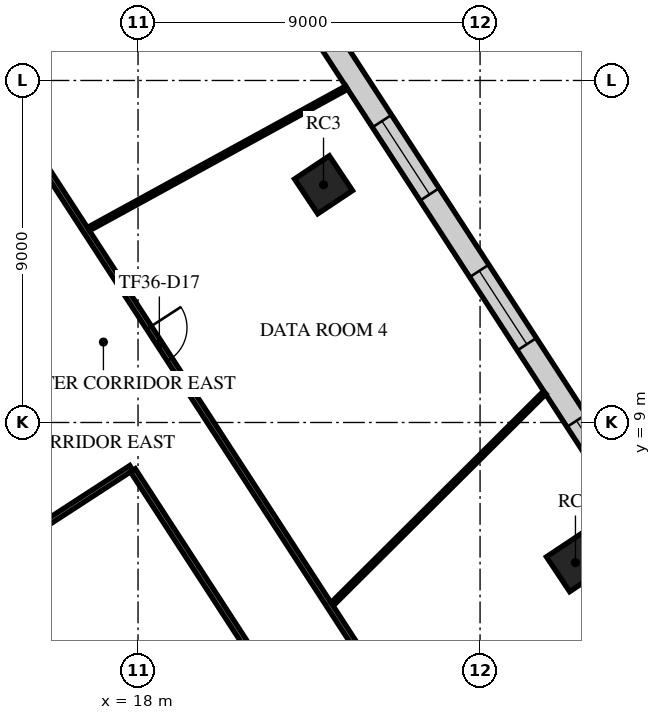
"""IFC4 building model, lengths in metres.
Left out: names, types, materials, properties, quantities, classifications, styles, units other than length and angle.
Written with IfcOpenShell. Run it as: python <this file> out.ifc"""

import sys

from ifc_helpers import new_model, si_unit, direction, frame, frame_2d, origin, origin_2d, place, context, subcontext, project, spatial, rectangle, extrude, element, fill, save


model = new_model("IFC4")
c1 = context("Model", 3, precision=1e-05, world=origin(), true_north=direction((0.0, 1.0)))
c2 = subcontext(c1, "Body", "Model", "MODEL_VIEW")
j1 = project(units=[si_unit("LENGTHUNIT", "METRE"), si_unit("PLANEANGLEUNIT", "RADIAN")], contexts=[c1])
p1 = place(None, origin())
s1 = spatial("IfcSite", under=j1, at=p1, CompositionType="ELEMENT")
p2 = place(p1, origin())
s2 = spatial("IfcBuilding", under=s1, at=p2, CompositionType="ELEMENT")
p3 = place(p2, frame((0.0, 0.0, 155.7)))
s3 = spatial("IfcBuildingStorey", under=s2, at=p3, CompositionType="ELEMENT", Elevation=155.7)
for number, where, z_axis, x_axis in (
    (1, (29.51, 5.312, 0.0), (0.0, 0.0, 1.0), (0.832, 0.555, 0.0)),
    (2, (22.881, 15.255, 0.0), (0.0, 0.0, 1.0), (0.832, 0.555, 0.0)),
):
    element("IfcColumn", number, at=place(p3, frame(where, z_axis=z_axis, x_axis=x_axis)), inside=s3, PredefinedType="COLUMN", context=c2, shape_type="SweptSolid", body=[
        extrude(rectangle(XDim=1.1, YDim=1.1, at=origin_2d()), origin(), (0.0, 0.0, 1.0), 4.0),
    ])
p4 = place(p3, frame((36.496, -1.667, 0.0), z_axis=(0.0, 0.0, 1.0), x_axis=(-0.544637117646, 0.838671813096, 0.0)))
e3 = element("IfcWall", 3, at=p4, inside=s3, PredefinedType="STANDARD", context=c2, shape_type="SweptSolid", body=[
    extrude(rectangle(XDim=42.176, YDim=0.6, at=frame_2d((21.088, 0.0))), origin(), (0.0, 0.0, 1.0), 3.6),
])
p5 = place(p4, frame((1.138, 0.0, 0.9)))
e4 = element("IfcOpeningElement", 4, at=p5, cuts=e3, PredefinedType="OPENING", context=c2, shape_type="SweptSolid", body=[
    extrude(rectangle(XDim=2.3, YDim=2.1, at=frame_2d((1.15, 1.05))), frame((0.0, 0.31, 0.0), z_axis=(0.0, -1.0, 0.0), x_axis=(1.0, 0.0, 0.0)), (0.0, 0.0, 1.0), 0.62),
])
p6 = place(p4, frame((5.776, 0.0, 0.9)))
e5 = element("IfcOpeningElement", 5, at=p6, cuts=e3, PredefinedType="OPENING", context=c2, shape_type="SweptSolid", body=[
    extrude(rectangle(XDim=2.3, YDim=2.1, at=frame_2d((1.15, 1.05))), frame((0.0, 0.31, 0.0), z_axis=(0.0, -1.0, 0.0), x_axis=(1.0, 0.0, 0.0)), (0.0, 0.0, 1.0), 0.62),
])
p7 = place(p4, frame((10.476, 0.0, 0.9)))
e6 = element("IfcOpeningElement", 6, at=p7, cuts=e3, PredefinedType="OPENING", context=c2, shape_type="SweptSolid", body=[
    extrude(rectangle(XDim=2.3, YDim=2.1, at=frame_2d((1.15, 1.05))), frame((0.0, 0.31, 0.0), z_axis=(0.0, -1.0, 0.0), x_axis=(1.0, 0.0, 0.0)), (0.0, 0.0, 1.0), 0.62),
])
p8 = place(p4, frame((15.176, 0.0, 0.9)))
e7 = element("IfcOpeningElement", 7, at=p8, cuts=e3, PredefinedType="OPENING", context=c2, shape_type="SweptSolid", body=[
    extrude(rectangle(XDim=2.3, YDim=2.1, at=frame_2d((1.15, 1.05))), frame((0.0, 0.31, 0.0), z_axis=(0.0, -1.0, 0.0), x_axis=(1.0, 0.0, 0.0)), (0.0, 0.0, 1.0), 0.62),
])
p9 = place(p4, frame((19.876, 0.0, 0.9)))
e8 = element("IfcOpeningElement", 8, at=p9, cuts=e3, PredefinedType="OPENING", context=c2, shape_type="SweptSolid", body=[
    extrude(rectangle(XDim=2.3, YDim=2.1, at=frame_2d((1.15, 1.05))), frame((0.0, 0.31, 0.0), z_axis=(0.0, -1.0, 0.0), x_axis=(1.0, 0.0, 0.0)), (0.0, 0.0, 1.0), 0.62),
])
p10 = place(p4, frame((24.576, 0.0, 0.9)))
e9 = element("IfcOpeningElement", 9, at=p10, cuts=e3, PredefinedType="OPENING", context=c2, shape_type="SweptSolid", body=[
    extrude(rectangle(XDim=2.3, YDim=2.1, at=frame_2d((1.15, 1.05))), frame((0.0, 0.31, 0.0), z_axis=(0.0, -1.0, 0.0), x_axis=(1.0, 0.0, 0.0)), (0.0, 0.0, 1.0), 0.62),
])
p11 = place(p4, frame((29.276, 0.0, 0.9)))
e10 = element("IfcOpeningElement", 10, at=p11, cuts=e3, PredefinedType="OPENING", context=c2, shape_type="SweptSolid", body=[
    extrude(rectangle(XDim=2.3, YDim=2.1, at=frame_2d((1.15, 1.05))), frame((0.0, 0.31, 0.0), z_axis=(0.0, -1.0, 0.0), x_axis=(1.0, 0.0, 0.0)), (0.0, 0.0, 1.0), 0.62),
])
p12 = place(p4, frame((33.976, 0.0, 0.9)))
e11 = element("IfcOpeningElement", 11, at=p12, cuts=e3, PredefinedType="OPENING", context=c2, shape_type="SweptSolid", body=[
    extrude(rectangle(XDim=2.3, YDim=2.1, at=frame_2d((1.15, 1.05))), frame((0.0, 0.31, 0.0), z_axis=(0.0, -1.0, 0.0), x_axis=(1.0, 0.0, 0.0)), (0.0, 0.0, 1.0), 0.62),
])
p13 = place(p4, frame((38.676, 0.0, 0.9)))
e12 = element("IfcOpeningElement", 12, at=p13, cuts=e3, PredefinedType="OPENING", context=c2, shape_type="SweptSolid", body=[
    extrude(rectangle(XDim=2.3, YDim=2.1, at=frame_2d((1.15, 1.05))), frame((0.0, 0.31, 0.0), z_axis=(0.0, -1.0, 0.0), x_axis=(1.0, 0.0, 0.0)), (0.0, 0.0, 1.0), 0.62),
])
p14 = place(p3, frame((10.958, 22.783, 0.0), z_axis=(0.0, 0.0, 1.0), x_axis=(0.544655201926, -0.838660068809, 0.0)))
e13 = element("IfcWall", 13, at=p14, inside=s3, PredefinedType="PARTITIONING", context=c2, shape_type="SweptSolid", body=[
    extrude(rectangle(XDim=26.354, YDim=0.15, at=frame_2d((13.177, 0.0))), origin(), (0.0, 0.0, 1.0), 3.15),
])
p15 = place(p14, frame((13.46, 0.0, 0.0)))
e14 = element("IfcOpeningElement", 14, at=p15, cuts=e13, PredefinedType="OPENING", context=c2, shape_type="SweptSolid", body=[
    extrude(rectangle(XDim=1.0, YDim=2.1, at=frame_2d((0.5, 1.05))), frame((0.0, 0.085, 0.0), z_axis=(0.0, -1.0, 0.0), x_axis=(1.0, 0.0, 0.0)), (0.0, 0.0, 1.0), 0.17),
])
p16 = place(p3, frame((15.516, 6.304, 0.0), z_axis=(0.0, 0.0, 1.0), x_axis=(0.838528716493, 0.544857404846, 0.0)))
e15 = element("IfcWall", 15, at=p16, inside=s3, PredefinedType="PARTITIONING", context=c2, shape_type="SweptSolid", body=[
    extrude(rectangle(XDim=2.753, YDim=0.15, at=frame_2d((1.376, 0.0))), origin(), (0.0, 0.0, 1.0), 3.6),
])
p17 = place(p3, frame((17.865, 7.741, 0.0), z_axis=(0.0, 0.0, 1.0), x_axis=(0.544664903491, -0.838653768193, 0.0)))
e16 = element("IfcWall", 16, at=p17, inside=s3, PredefinedType="PARTITIONING", context=c2, shape_type="SweptSolid", body=[
    extrude(rectangle(XDim=9.977, YDim=0.15, at=frame_2d((4.988, 0.0))), origin(), (0.0, 0.0, 1.0), 3.15),
])
p18 = place(p17, frame((6.05, 0.0, 0.0)))
e17 = element("IfcOpeningElement", 17, at=p18, cuts=e16, PredefinedType="OPENING", context=c2, shape_type="SweptSolid", body=[
    extrude(rectangle(XDim=1.0, YDim=2.1, at=frame_2d((0.5, 1.05))), frame((0.0, 0.085, 0.0), z_axis=(0.0, -1.0, 0.0), x_axis=(1.0, 0.0, 0.0)), (0.0, 0.0, 1.0), 0.17),
])
p19 = place(p3, frame((16.697, 14.091, 0.0), z_axis=(0.0, 0.0, 1.0), x_axis=(0.877061470745, 0.480378159926, 0.0)))
e18 = element("IfcWall", 18, at=p19, inside=s3, PredefinedType="PARTITIONING", context=c2, shape_type="SweptSolid", body=[
    extrude(rectangle(XDim=7.742, YDim=0.1, at=frame_2d((3.871, 0.0))), origin(), (0.0, 0.0, 1.0), 2.9),
])
p20 = place(p3, frame((23.113, 4.223, 0.0), z_axis=(0.0, 0.0, 1.0), x_axis=(0.708669203066, 0.705540899329, 0.0)))
e19 = element("IfcWall", 19, at=p20, inside=s3, PredefinedType="PARTITIONING", context=c2, shape_type="SweptSolid", body=[
    extrude(rectangle(XDim=7.882, YDim=0.1, at=frame_2d((3.941, 0.0))), origin(), (0.0, 0.0, 1.0), 2.9),
])
p21 = place(p7, origin())
e20 = element("IfcWindow", 20, at=p21, inside=s3, PartitioningType="SINGLE_PANEL", PredefinedType="WINDOW", context=c2, shape_type="SweptSolid", body=[
    extrude(rectangle(XDim=2.3, YDim=2.1, at=frame_2d((1.15, 1.05))), frame((0.0, 0.03, 0.0), z_axis=(0.0, -1.0, 0.0), x_axis=(1.0, 0.0, 0.0)), (0.0, 0.0, 1.0), 0.06),
])
fill(e6, e20)
p22 = place(p8, origin())
e21 = element("IfcWindow", 21, at=p22, inside=s3, PartitioningType="SINGLE_PANEL", PredefinedType="WINDOW", context=c2, shape_type="SweptSolid", body=[
    extrude(rectangle(XDim=2.3, YDim=2.1, at=frame_2d((1.15, 1.05))), frame((0.0, 0.03, 0.0), z_axis=(0.0, -1.0, 0.0), x_axis=(1.0, 0.0, 0.0)), (0.0, 0.0, 1.0), 0.06),
])
fill(e7, e21)
p23 = place(p9, origin())
e22 = element("IfcWindow", 22, at=p23, inside=s3, PartitioningType="SINGLE_PANEL", PredefinedType="WINDOW", context=c2, shape_type="SweptSolid", body=[
    extrude(rectangle(XDim=2.3, YDim=2.1, at=frame_2d((1.15, 1.05))), frame((0.0, 0.03, 0.0), z_axis=(0.0, -1.0, 0.0), x_axis=(1.0, 0.0, 0.0)), (0.0, 0.0, 1.0), 0.06),
])
fill(e8, e22)
p24 = place(p15, origin())
e23 = element("IfcDoor", 23, at=p24, inside=s3, OperationType="SINGLE_SWING_RIGHT", PredefinedType="DOOR", context=c2, shape_type="SweptSolid", body=[
    extrude(rectangle(XDim=1.0, YDim=2.1, at=frame_2d((0.5, 1.05))), frame((0.0, 0.025, 0.0), z_axis=(0.0, -1.0, 0.0), x_axis=(1.0, 0.0, 0.0)), (0.0, 0.0, 1.0), 0.05),
])
fill(e14, e23)
save(model, sys.argv[1])
